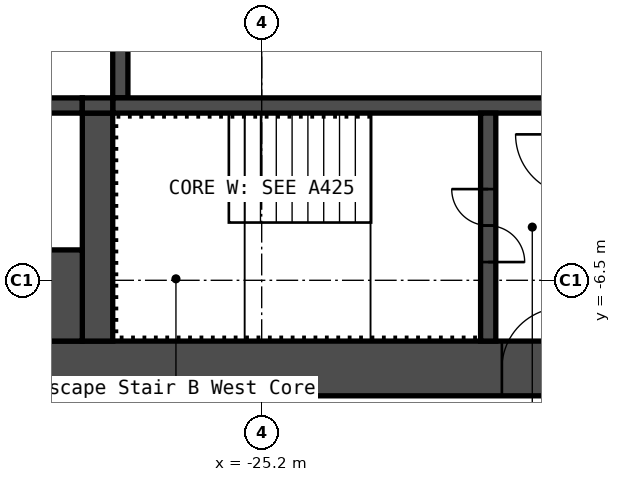
"""IFC4 building model, lengths in metres.
Left out: names, types, materials, properties, quantities, classifications, styles, units other than length and angle.
Written with IfcOpenShell. Run it as: python <this file> out.ifc"""

import sys

from ifc_helpers import new_model, si_unit, direction, frame, frame_2d, origin, place, context, subcontext, project, spatial, rectangle, extrude, element, fill, save


model = new_model("IFC4")
c1 = context("Model", 3, precision=1e-05, world=origin(), true_north=direction((0.0, 1.0)))
c2 = subcontext(c1, "Body", "Model", "MODEL_VIEW")
j1 = project(units=[si_unit("LENGTHUNIT", "METRE"), si_unit("PLANEANGLEUNIT", "RADIAN")], contexts=[c1])
p1 = place(None, origin())
s1 = spatial("IfcSite", under=j1, at=p1, CompositionType="ELEMENT")
p2 = place(p1, origin())
s2 = spatial("IfcBuilding", under=s1, at=p2, CompositionType="ELEMENT")
p3 = place(p2, frame((0.0, 0.0, 172.6)))
s3 = spatial("IfcBuildingStorey", under=s2, at=p3, CompositionType="ELEMENT", Elevation=172.6)
p4 = place(p3, frame((-32.7, -7.95, 0.0), z_axis=(0.0, 0.0, 1.0), x_axis=(1.0, 0.0, 0.0)))
e1 = element("IfcWall", 1, at=p4, inside=s3, PredefinedType="SHEAR", context=c2, shape_type="SweptSolid", body=[
    extrude(rectangle(XDim=15.0, YDim=0.9, at=frame_2d((7.5, 0.0))), origin(), (0.0, 0.0, 1.0), 2.9),
])
p5 = place(p4, frame((11.45, 0.0, 0.0)))
e2 = element("IfcOpeningElement", 2, at=p5, cuts=e1, PredefinedType="OPENING", context=c2, shape_type="SweptSolid", body=[
    extrude(rectangle(XDim=1.0, YDim=2.1, at=frame_2d((0.5, 1.05))), frame((0.0, 0.46, 0.0), z_axis=(0.0, -1.0, 0.0), x_axis=(1.0, 0.0, 0.0)), (0.0, 0.0, 1.0), 0.92),
])
p6 = place(p3, frame((-27.525, -3.5, 0.0), z_axis=(0.0, 0.0, 1.0), x_axis=(0.0, 1.0, 0.0)))
e3 = element("IfcWall", 3, at=p6, inside=s3, PredefinedType="SHEAR", context=c2, shape_type="SweptSolid", body=[
    extrude(rectangle(XDim=2.05, YDim=0.25, at=frame_2d((1.025, 0.0))), origin(), (0.0, 0.0, 1.0), 2.9),
])
p7 = place(p3, frame((-27.65, -3.625, 0.0), z_axis=(0.0, 0.0, 1.0), x_axis=(1.0, 0.0, 0.0)))
e4 = element("IfcWall", 4, at=p7, inside=s3, PredefinedType="SHEAR", context=c2, shape_type="SweptSolid", body=[
    extrude(rectangle(XDim=7.5, YDim=0.25, at=frame_2d((3.75, 0.0))), origin(), (0.0, 0.0, 1.0), 2.9),
])
p8 = place(p3, frame((-21.475, -7.5, 0.0), z_axis=(0.0, 0.0, 1.0), x_axis=(0.0, 1.0, 0.0)))
e5 = element("IfcWall", 5, at=p8, inside=s3, PredefinedType="SHEAR", context=c2, shape_type="SweptSolid", body=[
    extrude(rectangle(XDim=3.75, YDim=0.25, at=frame_2d((1.875, 0.0))), origin(), (0.0, 0.0, 1.0), 2.9),
])
p9 = place(p8, frame((1.3, 0.0, 0.0)))
e6 = element("IfcOpeningElement", 6, at=p9, cuts=e5, PredefinedType="OPENING", context=c2, shape_type="SweptSolid", body=[
    extrude(rectangle(XDim=1.2, YDim=2.1, at=frame_2d((0.6, 1.05))), frame((0.0, 0.135, 0.0), z_axis=(0.0, -1.0, 0.0), x_axis=(1.0, 0.0, 0.0)), (0.0, 0.0, 1.0), 0.27),
])
p10 = place(p3, frame((-27.9, -7.5, 0.0), z_axis=(0.0, 0.0, 1.0), x_axis=(0.0, 1.0, 0.0)))
e7 = element("IfcWall", 7, at=p10, inside=s3, PredefinedType="SHEAR", context=c2, shape_type="SweptSolid", body=[
    extrude(rectangle(XDim=3.75, YDim=0.5, at=frame_2d((1.875, 0.0))), origin(), (0.0, 0.0, 1.0), 2.9),
])
p11 = place(p3, frame((-32.7, -3.625, 0.0), z_axis=(0.0, 0.0, 1.0), x_axis=(1.0, 0.0, 0.0)))
e8 = element("IfcWall", 8, at=p11, inside=s3, PredefinedType="SHEAR", context=c2, shape_type="SweptSolid", body=[
    extrude(rectangle(XDim=4.55, YDim=0.25, at=frame_2d((2.275, 0.0))), origin(), (0.0, 0.0, 1.0), 2.9),
])
p12 = place(p11, frame((2.85, 0.0, 0.0)))
e9 = element("IfcOpeningElement", 9, at=p12, cuts=e8, PredefinedType="OPENING", context=c2, shape_type="SweptSolid", body=[
    extrude(rectangle(XDim=1.1, YDim=2.1, at=frame_2d((0.55, 1.05))), frame((0.0, 0.135, 0.0), z_axis=(0.0, -1.0, 0.0), x_axis=(1.0, 0.0, 0.0)), (0.0, 0.0, 1.0), 0.27),
])
p13 = place(p11, frame((0.6, 0.0, 0.0)))
e10 = element("IfcOpeningElement", 10, at=p13, cuts=e8, PredefinedType="OPENING", context=c2, shape_type="SweptSolid", body=[
    extrude(rectangle(XDim=1.1, YDim=2.1, at=frame_2d((0.55, 1.05))), frame((0.0, 0.135, 0.0), z_axis=(0.0, -1.0, 0.0), x_axis=(1.0, 0.0, 0.0)), (0.0, 0.0, 1.0), 0.27),
])
p14 = place(p3, frame((-32.7, -6.75, 0.0), z_axis=(0.0, 0.0, 1.0), x_axis=(1.0, 0.0, 0.0)))
e11 = element("IfcWall", 11, at=p14, inside=s3, PredefinedType="SHEAR", context=c2, shape_type="SweptSolid", body=[
    extrude(rectangle(XDim=4.55, YDim=1.5, at=frame_2d((2.275, 0.0))), origin(), (0.0, 0.0, 1.0), 2.9),
])
p15 = place(p3, frame((-28.15, -3.625, 0.0), z_axis=(0.0, 0.0, 1.0), x_axis=(1.0, 0.0, 0.0)))
e12 = element("IfcWall", 12, at=p15, inside=s3, PredefinedType="SHEAR", context=c2, shape_type="SweptSolid", body=[
    extrude(rectangle(XDim=0.5, YDim=0.25, at=frame_2d((0.25, 0.0))), origin(), (0.0, 0.0, 1.0), 2.9),
])
p16 = place(p5, origin())
e13 = element("IfcDoor", 13, at=p16, inside=s3, OperationType="SINGLE_SWING_LEFT", PredefinedType="DOOR", context=c2, shape_type="SweptSolid", body=[
    extrude(rectangle(XDim=1.0, YDim=2.1, at=frame_2d((0.5, 1.05))), frame((0.0, 0.025, 0.0), z_axis=(0.0, -1.0, 0.0), x_axis=(1.0, 0.0, 0.0)), (0.0, 0.0, 1.0), 0.05),
])
fill(e2, e13)
p17 = place(p9, origin())
e14 = element("IfcDoor", 14, at=p17, inside=s3, OperationType="DOUBLE_DOOR_SINGLE_SWING", PredefinedType="DOOR", context=c2, shape_type="SweptSolid", body=[
    extrude(rectangle(XDim=1.2, YDim=2.1, at=frame_2d((0.6, 1.05))), frame((0.0, 0.025, 0.0), z_axis=(0.0, -1.0, 0.0), x_axis=(1.0, 0.0, 0.0)), (0.0, 0.0, 1.0), 0.05),
])
fill(e6, e14)
save(model, sys.argv[1])
